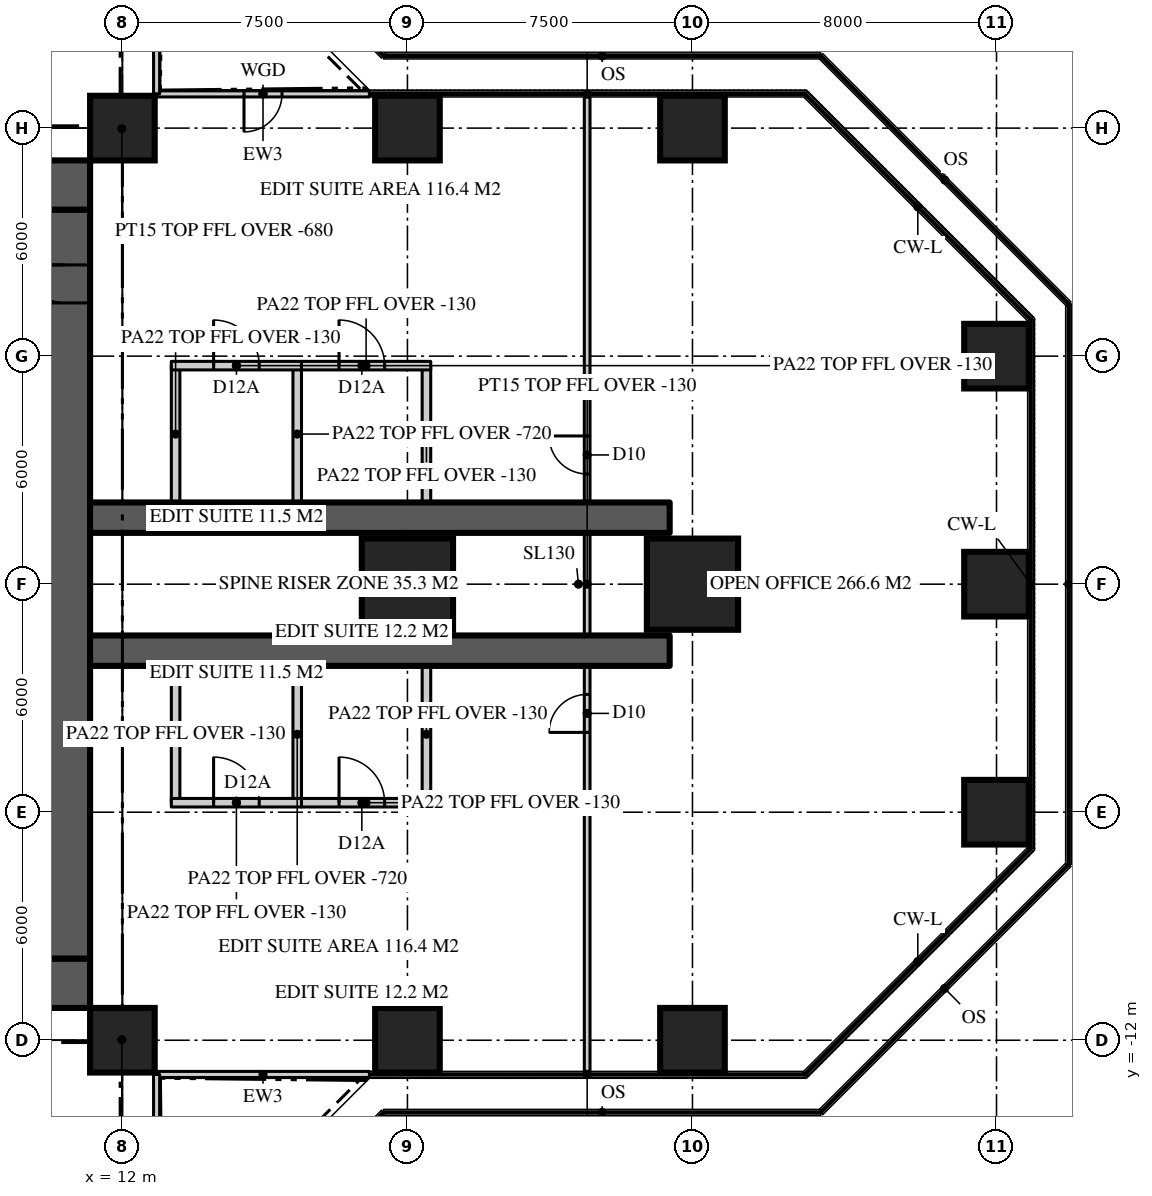
"""IFC4 building model, lengths in metres.
Left out: names, types, materials, properties, quantities, classifications, styles, units other than length and angle.
Written with IfcOpenShell. Run it as: python <this file> out.ifc"""

import sys

from ifc_helpers import new_model, si_unit, direction, frame, frame_2d, origin, origin_2d, place, context, subcontext, project, spatial, rectangle, extrude, element, fill, save


model = new_model("IFC4")
c1 = context("Model", 3, precision=1e-05, world=origin(), true_north=direction((0.0, 1.0)))
c2 = subcontext(c1, "Body", "Model", "MODEL_VIEW")
j1 = project(units=[si_unit("LENGTHUNIT", "METRE"), si_unit("PLANEANGLEUNIT", "RADIAN")], contexts=[c1])
p1 = place(None, origin())
s1 = spatial("IfcSite", under=j1, at=p1, CompositionType="ELEMENT")
p2 = place(p1, origin())
s2 = spatial("IfcBuilding", under=s1, at=p2, CompositionType="ELEMENT")
p3 = place(p2, frame((0.0, 0.0, 55.2)))
s3 = spatial("IfcBuildingStorey", under=s2, at=p3, CompositionType="ELEMENT", Elevation=55.2)
p4 = place(p3, frame((-11.15, 10.5, 0.0), z_axis=(0.0, 0.0, 1.0), x_axis=(1.0, 0.0, 0.0)))
e1 = element("IfcWall", 1, at=p4, inside=s3, PredefinedType="SHEAR", context=c2, shape_type="SweptSolid", body=[
    extrude(rectangle(XDim=22.3, YDim=1.3, at=frame_2d((11.15, 0.0))), origin(), (0.0, 0.0, 1.0), 3.9),
])
p5 = place(p4, frame((4.25, 0.0, 0.0)))
e2 = element("IfcOpeningElement", 2, at=p5, cuts=e1, PredefinedType="OPENING", context=c2, shape_type="SweptSolid", body=[
    extrude(rectangle(XDim=1.8, YDim=2.2, at=frame_2d((0.9, 1.1))), frame((0.0, 0.66, 0.0), z_axis=(0.0, -1.0, 0.0), x_axis=(1.0, 0.0, 0.0)), (0.0, 0.0, 1.0), 1.32),
])
p6 = place(p4, frame((16.25, 0.0, 0.0)))
e3 = element("IfcOpeningElement", 3, at=p6, cuts=e1, PredefinedType="OPENING", context=c2, shape_type="SweptSolid", body=[
    extrude(rectangle(XDim=1.8, YDim=2.2, at=frame_2d((0.9, 1.1))), frame((0.0, 0.66, 0.0), z_axis=(0.0, -1.0, 0.0), x_axis=(1.0, 0.0, 0.0)), (0.0, 0.0, 1.0), 1.32),
])
p7 = place(p3, frame((11.15, -10.5, 0.0), z_axis=(0.0, 0.0, 1.0), x_axis=(-1.0, 0.0, 0.0)))
e4 = element("IfcWall", 4, at=p7, inside=s3, PredefinedType="SHEAR", context=c2, shape_type="SweptSolid", body=[
    extrude(rectangle(XDim=22.3, YDim=1.3, at=frame_2d((11.15, 0.0))), origin(), (0.0, 0.0, 1.0), 3.9),
])
p8 = place(p7, frame((16.25, 0.0, 0.0)))
e5 = element("IfcOpeningElement", 5, at=p8, cuts=e4, PredefinedType="OPENING", context=c2, shape_type="SweptSolid", body=[
    extrude(rectangle(XDim=1.8, YDim=2.2, at=frame_2d((0.9, 1.1))), frame((0.0, 0.66, 0.0), z_axis=(0.0, -1.0, 0.0), x_axis=(1.0, 0.0, 0.0)), (0.0, 0.0, 1.0), 1.32),
])
p9 = place(p7, frame((4.25, 0.0, 0.0)))
e6 = element("IfcOpeningElement", 6, at=p9, cuts=e4, PredefinedType="OPENING", context=c2, shape_type="SweptSolid", body=[
    extrude(rectangle(XDim=1.8, YDim=2.2, at=frame_2d((0.9, 1.1))), frame((0.0, 0.66, 0.0), z_axis=(0.0, -1.0, 0.0), x_axis=(1.0, 0.0, 0.0)), (0.0, 0.0, 1.0), 1.32),
])
p10 = place(p3, frame((10.5, -9.85, 0.0), z_axis=(0.0, 0.0, 1.0), x_axis=(0.0, 1.0, 0.0)))
e7 = element("IfcWall", 7, at=p10, inside=s3, PredefinedType="SHEAR", context=c2, shape_type="SweptSolid", body=[
    extrude(rectangle(XDim=19.7, YDim=1.3, at=frame_2d((9.85, 0.0))), origin(), (0.0, 0.0, 1.0), 3.9),
])
p11 = place(p10, frame((17.25, 0.0, 0.0)))
e8 = element("IfcOpeningElement", 8, at=p11, cuts=e7, PredefinedType="OPENING", context=c2, shape_type="SweptSolid", body=[
    extrude(rectangle(XDim=1.0, YDim=2.2, at=frame_2d((0.5, 1.1))), frame((0.0, 0.66, 0.0), z_axis=(0.0, -1.0, 0.0), x_axis=(1.0, 0.0, 0.0)), (0.0, 0.0, 1.0), 1.32),
])
for number, where, z_axis, x_axis in (
    (9, (11.15, -1.75, 0.0), (0.0, 0.0, 1.0), (1.0, 0.0, 0.0)),
    (10, (11.15, 1.75, 0.0), (0.0, 0.0, 1.0), (1.0, 0.0, 0.0)),
):
    element("IfcWall", number, at=place(p3, frame(where, z_axis=z_axis, x_axis=x_axis)), inside=s3, PredefinedType="SHEAR", context=c2, shape_type="SweptSolid", body=[
        extrude(rectangle(XDim=15.25, YDim=0.8, at=frame_2d((7.625, 0.0))), origin(), (0.0, 0.0, 1.0), 3.9),
    ])
for number, where, z_axis, x_axis in (
    (11, (12.0, -12.0, 0.0), (0.0, 0.0, 1.0), (1.0, 0.0, 0.0)),
    (12, (19.5, -12.0, 0.0), (0.0, 0.0, 1.0), (1.0, 0.0, 0.0)),
    (13, (27.0, -12.0, 0.0), (0.0, 0.0, 1.0), (1.0, 0.0, 0.0)),
    (14, (35.0, -6.0, 0.0), (0.0, 0.0, 1.0), (1.0, 0.0, 0.0)),
):
    element("IfcColumn", number, at=place(p3, frame(where, z_axis=z_axis, x_axis=x_axis)), inside=s3, PredefinedType="COLUMN", context=c2, shape_type="SweptSolid", body=[
        extrude(rectangle(XDim=1.7, YDim=1.7, at=origin_2d()), origin(), (0.0, 0.0, 1.0), 3.9),
    ])
for number, where, z_axis, x_axis in (
    (15, (19.5, 0.0, 0.0), (0.0, 0.0, 1.0), (1.0, 0.0, 0.0)),
    (16, (27.0, 0.0, 0.0), (0.0, 0.0, 1.0), (1.0, 0.0, 0.0)),
):
    element("IfcColumn", number, at=place(p3, frame(where, z_axis=z_axis, x_axis=x_axis)), inside=s3, PredefinedType="COLUMN", context=c2, shape_type="SweptSolid", body=[
        extrude(rectangle(XDim=2.4, YDim=2.4, at=origin_2d()), origin(), (0.0, 0.0, 1.0), 3.9),
    ])
for number, where, z_axis, x_axis in (
    (17, (35.0, 0.0, 0.0), (0.0, 0.0, 1.0), (1.0, 0.0, 0.0)),
    (18, (35.0, 6.0, 0.0), (0.0, 0.0, 1.0), (1.0, 0.0, 0.0)),
    (19, (12.0, 12.0, 0.0), (0.0, 0.0, 1.0), (1.0, 0.0, 0.0)),
    (20, (19.5, 12.0, 0.0), (0.0, 0.0, 1.0), (1.0, 0.0, 0.0)),
    (21, (27.0, 12.0, 0.0), (0.0, 0.0, 1.0), (1.0, 0.0, 0.0)),
):
    element("IfcColumn", number, at=place(p3, frame(where, z_axis=z_axis, x_axis=x_axis)), inside=s3, PredefinedType="COLUMN", context=c2, shape_type="SweptSolid", body=[
        extrude(rectangle(XDim=1.7, YDim=1.7, at=origin_2d()), origin(), (0.0, 0.0, 1.0), 3.9),
    ])
p12 = place(p3, frame((12.9, -12.9, 0.0), z_axis=(0.0, 0.0, 1.0), x_axis=(1.0, 0.0, 0.0)))
e22 = element("IfcWall", 22, at=p12, inside=s3, PredefinedType="SOLIDWALL", context=c2, shape_type="SweptSolid", body=[
    extrude(rectangle(XDim=5.6, YDim=0.16, at=frame_2d((2.8, 0.0))), origin(), (0.0, 0.0, 1.0), 3.77),
])
p13 = place(p3, frame((18.5, 12.9, 0.0), z_axis=(0.0, 0.0, 1.0), x_axis=(-1.0, 0.0, 0.0)))
e23 = element("IfcWall", 23, at=p13, inside=s3, PredefinedType="SOLIDWALL", context=c2, shape_type="SweptSolid", body=[
    extrude(rectangle(XDim=5.6, YDim=0.16, at=frame_2d((2.8, 0.0))), origin(), (0.0, 0.0, 1.0), 3.77),
])
p14 = place(p13, frame((2.3, 0.0, 0.0)))
e24 = element("IfcOpeningElement", 24, at=p14, cuts=e23, PredefinedType="OPENING", context=c2, shape_type="SweptSolid", body=[
    extrude(rectangle(XDim=1.0, YDim=2.2, at=frame_2d((0.5, 1.1))), frame((0.0, 0.09, 0.0), z_axis=(0.0, -1.0, 0.0), x_axis=(1.0, 0.0, 0.0)), (0.0, 0.0, 1.0), 0.18),
])
p15 = place(p3, frame((12.9, 12.9, 0.0), z_axis=(0.0, 0.0, 1.0), x_axis=(0.0, 1.0, 0.0)))
e25 = element("IfcWall", 25, at=p15, inside=s3, PredefinedType="SOLIDWALL", context=c2, shape_type="SweptSolid", body=[
    extrude(rectangle(XDim=5.6, YDim=0.16, at=frame_2d((2.8, 0.0))), origin(), (0.0, 0.0, 1.0), 3.77),
])
p16 = place(p3, frame((12.9, -18.5, 0.0), z_axis=(0.0, 0.0, 1.0), x_axis=(0.0, 1.0, 0.0)))
e26 = element("IfcWall", 26, at=p16, inside=s3, PredefinedType="SOLIDWALL", context=c2, shape_type="SweptSolid", body=[
    extrude(rectangle(XDim=5.6, YDim=0.16, at=frame_2d((2.8, 0.0))), origin(), (0.0, 0.0, 1.0), 3.77),
])
p17 = place(p16, frame((2.3, 0.0, 0.0)))
e27 = element("IfcOpeningElement", 27, at=p17, cuts=e26, PredefinedType="OPENING", context=c2, shape_type="SweptSolid", body=[
    extrude(rectangle(XDim=1.0, YDim=2.2, at=frame_2d((0.5, 1.1))), frame((0.0, 0.09, 0.0), z_axis=(0.0, -1.0, 0.0), x_axis=(1.0, 0.0, 0.0)), (0.0, 0.0, 1.0), 0.18),
])
p18 = place(p3, frame((24.229, -12.82, 0.0), z_axis=(0.0, 0.0, 1.0), x_axis=(0.0, 1.0, 0.0)))
e28 = element("IfcWall", 28, at=p18, inside=s3, PredefinedType="PARTITIONING", context=c2, shape_type="SweptSolid", body=[
    extrude(rectangle(XDim=25.64, YDim=0.15, at=frame_2d((12.82, 0.0))), origin(), (0.0, 0.0, 1.0), 3.77),
])
p19 = place(p18, frame((15.72, 0.0, 0.0)))
e29 = element("IfcOpeningElement", 29, at=p19, cuts=e28, PredefinedType="OPENING", context=c2, shape_type="SweptSolid", body=[
    extrude(rectangle(XDim=1.0, YDim=2.2, at=frame_2d((0.5, 1.1))), frame((0.0, 0.085, 0.0), z_axis=(0.0, -1.0, 0.0), x_axis=(1.0, 0.0, 0.0)), (0.0, 0.0, 1.0), 0.17),
])
p20 = place(p18, frame((8.92, 0.0, 0.0)))
e30 = element("IfcOpeningElement", 30, at=p20, cuts=e28, PredefinedType="OPENING", context=c2, shape_type="SweptSolid", body=[
    extrude(rectangle(XDim=1.0, YDim=2.2, at=frame_2d((0.5, 1.1))), frame((0.0, 0.085, 0.0), z_axis=(0.0, -1.0, 0.0), x_axis=(1.0, 0.0, 0.0)), (0.0, 0.0, 1.0), 0.17),
])
p21 = place(p3, frame((13.4, 2.15, 0.0), z_axis=(0.0, 0.0, 1.0), x_axis=(0.0, 1.0, 0.0)))
e31 = element("IfcWall", 31, at=p21, inside=s3, PredefinedType="PARTITIONING", context=c2, shape_type="SweptSolid", body=[
    extrude(rectangle(XDim=3.6, YDim=0.225, at=frame_2d((1.8, 0.0))), origin(), (0.0, 0.0, 1.0), 3.77),
])
p22 = place(p3, frame((16.6, 2.15, 0.0), z_axis=(0.0, 0.0, 1.0), x_axis=(0.0, 1.0, 0.0)))
e32 = element("IfcWall", 32, at=p22, inside=s3, PredefinedType="PARTITIONING", context=c2, shape_type="SweptSolid", body=[
    extrude(rectangle(XDim=3.6, YDim=0.225, at=frame_2d((1.8, 0.0))), origin(), (0.0, 0.0, 1.0), 3.18),
])
p23 = place(p3, frame((13.288, 5.75, 0.0), z_axis=(0.0, 0.0, 1.0), x_axis=(1.0, 0.0, 0.0)))
e33 = element("IfcWall", 33, at=p23, inside=s3, PredefinedType="PARTITIONING", context=c2, shape_type="SweptSolid", body=[
    extrude(rectangle(XDim=3.425, YDim=0.225, at=frame_2d((1.712, 0.0))), origin(), (0.0, 0.0, 1.0), 3.77),
])
p24 = place(p23, frame((1.113, 0.0, 0.0)))
e34 = element("IfcOpeningElement", 34, at=p24, cuts=e33, PredefinedType="OPENING", context=c2, shape_type="SweptSolid", body=[
    extrude(rectangle(XDim=1.2, YDim=2.2, at=frame_2d((0.6, 1.1))), frame((0.0, 0.123, 0.0), z_axis=(0.0, -1.0, 0.0), x_axis=(1.0, 0.0, 0.0)), (0.0, 0.0, 1.0), 0.245),
])
p25 = place(p3, frame((20.0, 2.15, 0.0), z_axis=(0.0, 0.0, 1.0), x_axis=(0.0, 1.0, 0.0)))
e35 = element("IfcWall", 35, at=p25, inside=s3, PredefinedType="PARTITIONING", context=c2, shape_type="SweptSolid", body=[
    extrude(rectangle(XDim=3.6, YDim=0.225, at=frame_2d((1.8, 0.0))), origin(), (0.0, 0.0, 1.0), 3.77),
])
p26 = place(p3, frame((16.712, 5.75, 0.0), z_axis=(0.0, 0.0, 1.0), x_axis=(1.0, 0.0, 0.0)))
e36 = element("IfcWall", 36, at=p26, inside=s3, PredefinedType="PARTITIONING", context=c2, shape_type="SweptSolid", body=[
    extrude(rectangle(XDim=3.4, YDim=0.225, at=frame_2d((1.7, 0.0))), origin(), (0.0, 0.0, 1.0), 3.77),
])
p27 = place(p26, frame((0.988, 0.0, 0.0)))
e37 = element("IfcOpeningElement", 37, at=p27, cuts=e36, PredefinedType="OPENING", context=c2, shape_type="SweptSolid", body=[
    extrude(rectangle(XDim=1.2, YDim=2.2, at=frame_2d((0.6, 1.1))), frame((0.0, 0.123, 0.0), z_axis=(0.0, -1.0, 0.0), x_axis=(1.0, 0.0, 0.0)), (0.0, 0.0, 1.0), 0.245),
])
p28 = place(p3, frame((13.4, -2.15, 0.0), z_axis=(0.0, 0.0, 1.0), x_axis=(0.0, -1.0, 0.0)))
e38 = element("IfcWall", 38, at=p28, inside=s3, PredefinedType="PARTITIONING", context=c2, shape_type="SweptSolid", body=[
    extrude(rectangle(XDim=3.6, YDim=0.225, at=frame_2d((1.8, 0.0))), origin(), (0.0, 0.0, 1.0), 3.77),
])
p29 = place(p3, frame((16.6, -2.15, 0.0), z_axis=(0.0, 0.0, 1.0), x_axis=(0.0, -1.0, 0.0)))
e39 = element("IfcWall", 39, at=p29, inside=s3, PredefinedType="PARTITIONING", context=c2, shape_type="SweptSolid", body=[
    extrude(rectangle(XDim=3.6, YDim=0.225, at=frame_2d((1.8, 0.0))), origin(), (0.0, 0.0, 1.0), 3.18),
])
p30 = place(p3, frame((13.288, -5.75, 0.0), z_axis=(0.0, 0.0, 1.0), x_axis=(1.0, 0.0, 0.0)))
e40 = element("IfcWall", 40, at=p30, inside=s3, PredefinedType="PARTITIONING", context=c2, shape_type="SweptSolid", body=[
    extrude(rectangle(XDim=3.425, YDim=0.225, at=frame_2d((1.712, 0.0))), origin(), (0.0, 0.0, 1.0), 3.77),
])
p31 = place(p30, frame((1.113, 0.0, 0.0)))
e41 = element("IfcOpeningElement", 41, at=p31, cuts=e40, PredefinedType="OPENING", context=c2, shape_type="SweptSolid", body=[
    extrude(rectangle(XDim=1.2, YDim=2.2, at=frame_2d((0.6, 1.1))), frame((0.0, 0.123, 0.0), z_axis=(0.0, -1.0, 0.0), x_axis=(1.0, 0.0, 0.0)), (0.0, 0.0, 1.0), 0.245),
])
p32 = place(p3, frame((20.0, -2.15, 0.0), z_axis=(0.0, 0.0, 1.0), x_axis=(0.0, -1.0, 0.0)))
e42 = element("IfcWall", 42, at=p32, inside=s3, PredefinedType="PARTITIONING", context=c2, shape_type="SweptSolid", body=[
    extrude(rectangle(XDim=3.6, YDim=0.225, at=frame_2d((1.8, 0.0))), origin(), (0.0, 0.0, 1.0), 3.77),
])
p33 = place(p3, frame((16.712, -5.75, 0.0), z_axis=(0.0, 0.0, 1.0), x_axis=(1.0, 0.0, 0.0)))
e43 = element("IfcWall", 43, at=p33, inside=s3, PredefinedType="PARTITIONING", context=c2, shape_type="SweptSolid", body=[
    extrude(rectangle(XDim=3.4, YDim=0.225, at=frame_2d((1.7, 0.0))), origin(), (0.0, 0.0, 1.0), 3.77),
])
p34 = place(p33, frame((0.988, 0.0, 0.0)))
e44 = element("IfcOpeningElement", 44, at=p34, cuts=e43, PredefinedType="OPENING", context=c2, shape_type="SweptSolid", body=[
    extrude(rectangle(XDim=1.2, YDim=2.2, at=frame_2d((0.6, 1.1))), frame((0.0, 0.123, 0.0), z_axis=(0.0, -1.0, 0.0), x_axis=(1.0, 0.0, 0.0)), (0.0, 0.0, 1.0), 0.245),
])
for number, where, z_axis, x_axis in (
    (45, (11.15, 11.15, 0.0), (0.0, 0.0, 1.0), (0.707, 0.707, 0.0)),
    (46, (11.15, -11.15, 0.0), (0.0, 0.0, 1.0), (0.707, -0.707, 0.0)),
):
    element("IfcWall", number, at=place(p3, frame(where, z_axis=z_axis, x_axis=x_axis)), inside=s3, PredefinedType="PARTITIONING", context=c2, shape_type="SweptSolid", body=[
        extrude(rectangle(XDim=2.362, YDim=0.15, at=frame_2d((1.181, 0.0))), origin(), (0.0, 0.0, 1.0), 3.22),
    ])
p35 = place(p14, origin())
e47 = element("IfcDoor", 47, at=p35, inside=s3, OperationType="SINGLE_SWING_RIGHT", PredefinedType="DOOR", context=c2, shape_type="SweptSolid", body=[
    extrude(rectangle(XDim=1.0, YDim=2.2, at=frame_2d((0.5, 1.1))), frame((0.0, 0.025, 0.0), z_axis=(0.0, -1.0, 0.0), x_axis=(1.0, 0.0, 0.0)), (0.0, 0.0, 1.0), 0.05),
])
fill(e24, e47)
p36 = place(p11, origin())
e48 = element("IfcDoor", 48, at=p36, inside=s3, OperationType="SINGLE_SWING_RIGHT", PredefinedType="DOOR", context=c2, shape_type="SweptSolid", body=[
    extrude(rectangle(XDim=1.0, YDim=2.2, at=frame_2d((0.5, 1.1))), frame((0.0, 0.025, 0.0), z_axis=(0.0, -1.0, 0.0), x_axis=(1.0, 0.0, 0.0)), (0.0, 0.0, 1.0), 0.05),
])
fill(e8, e48)
p37 = place(p19, origin())
e49 = element("IfcDoor", 49, at=p37, inside=s3, OperationType="SINGLE_SWING_RIGHT", PredefinedType="DOOR", context=c2, shape_type="SweptSolid", body=[
    extrude(rectangle(XDim=1.0, YDim=2.2, at=frame_2d((0.5, 1.1))), frame((0.0, 0.025, 0.0), z_axis=(0.0, -1.0, 0.0), x_axis=(1.0, 0.0, 0.0)), (0.0, 0.0, 1.0), 0.05),
])
fill(e29, e49)
p38 = place(p20, origin())
e50 = element("IfcDoor", 50, at=p38, inside=s3, OperationType="SINGLE_SWING_LEFT", PredefinedType="DOOR", context=c2, shape_type="SweptSolid", body=[
    extrude(rectangle(XDim=1.0, YDim=2.2, at=frame_2d((0.5, 1.1))), frame((0.0, 0.025, 0.0), z_axis=(0.0, -1.0, 0.0), x_axis=(1.0, 0.0, 0.0)), (0.0, 0.0, 1.0), 0.05),
])
fill(e30, e50)
p39 = place(p24, origin())
e51 = element("IfcDoor", 51, at=p39, inside=s3, OperationType="SINGLE_SWING_LEFT", PredefinedType="DOOR", context=c2, shape_type="SweptSolid", body=[
    extrude(rectangle(XDim=1.2, YDim=2.2, at=frame_2d((0.6, 1.1))), frame((0.0, 0.025, 0.0), z_axis=(0.0, -1.0, 0.0), x_axis=(1.0, 0.0, 0.0)), (0.0, 0.0, 1.0), 0.05),
])
fill(e34, e51)
p40 = place(p27, origin())
e52 = element("IfcDoor", 52, at=p40, inside=s3, OperationType="SINGLE_SWING_LEFT", PredefinedType="DOOR", context=c2, shape_type="SweptSolid", body=[
    extrude(rectangle(XDim=1.2, YDim=2.2, at=frame_2d((0.6, 1.1))), frame((0.0, 0.025, 0.0), z_axis=(0.0, -1.0, 0.0), x_axis=(1.0, 0.0, 0.0)), (0.0, 0.0, 1.0), 0.05),
])
fill(e37, e52)
p41 = place(p31, origin())
e53 = element("IfcDoor", 53, at=p41, inside=s3, OperationType="SINGLE_SWING_LEFT", PredefinedType="DOOR", context=c2, shape_type="SweptSolid", body=[
    extrude(rectangle(XDim=1.2, YDim=2.2, at=frame_2d((0.6, 1.1))), frame((0.0, 0.025, 0.0), z_axis=(0.0, -1.0, 0.0), x_axis=(1.0, 0.0, 0.0)), (0.0, 0.0, 1.0), 0.05),
])
fill(e41, e53)
p42 = place(p34, origin())
e54 = element("IfcDoor", 54, at=p42, inside=s3, OperationType="SINGLE_SWING_LEFT", PredefinedType="DOOR", context=c2, shape_type="SweptSolid", body=[
    extrude(rectangle(XDim=1.2, YDim=2.2, at=frame_2d((0.6, 1.1))), frame((0.0, 0.025, 0.0), z_axis=(0.0, -1.0, 0.0), x_axis=(1.0, 0.0, 0.0)), (0.0, 0.0, 1.0), 0.05),
])
fill(e44, e54)
save(model, sys.argv[1])
